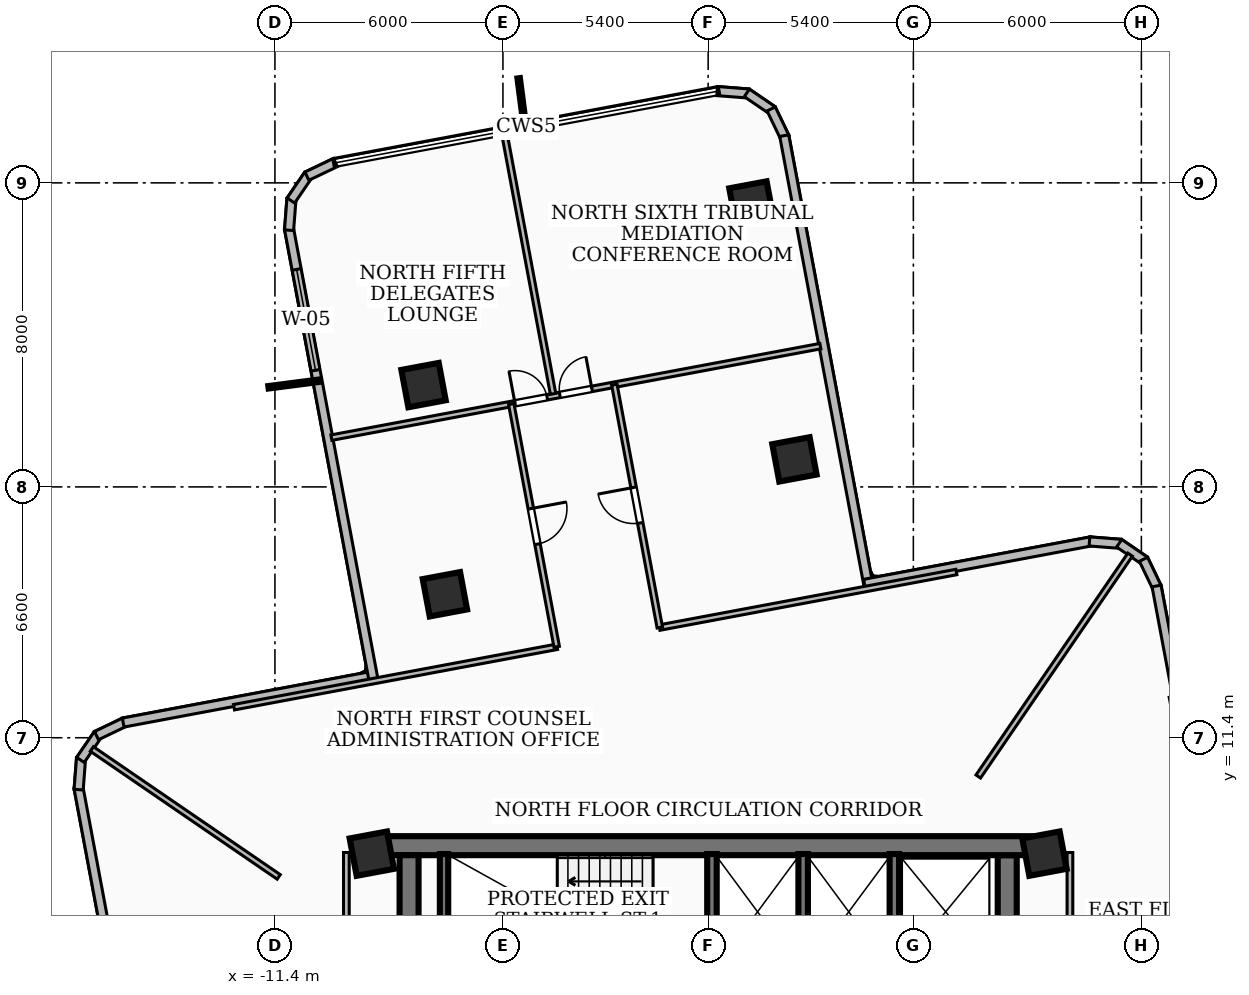
"""IFC4 building model, lengths in metres.
Left out: names, types, materials, properties, quantities, classifications, styles, units other than length and angle.
Written with IfcOpenShell. Run it as: python <this file> out.ifc"""

import sys

from ifc_helpers import new_model, si_unit, direction, frame, frame_2d, origin, origin_2d, place, context, subcontext, project, spatial, rectangle, extrude, element, fill, save


model = new_model("IFC4")
c1 = context("Model", 3, precision=1e-05, world=origin(), true_north=direction((0.0, 1.0)))
c2 = subcontext(c1, "Body", "Model", "MODEL_VIEW")
j1 = project(units=[si_unit("LENGTHUNIT", "METRE"), si_unit("PLANEANGLEUNIT", "RADIAN")], contexts=[c1])
p1 = place(None, origin())
s1 = spatial("IfcSite", under=j1, at=p1, CompositionType="ELEMENT")
p2 = place(p1, origin())
s2 = spatial("IfcBuilding", under=s1, at=p2, CompositionType="ELEMENT")
p3 = place(p2, frame((0.0, 0.0, 103.68)))
s3 = spatial("IfcBuildingStorey", under=s2, at=p3, CompositionType="ELEMENT", Elevation=103.68)
p4 = place(p3, frame((-8.78, 8.56, 0.0), z_axis=(0.0, 0.0, 1.0), x_axis=(1.0, 0.0, 0.0)))
e1 = element("IfcWall", 1, at=p4, inside=s3, PredefinedType="SHEAR", context=c2, shape_type="SweptSolid", body=[
    extrude(rectangle(XDim=17.56, YDim=0.5, at=frame_2d((8.78, 0.0))), origin(), (0.0, 0.0, 1.0), 3.2),
])
for number, where, z_axis, x_axis in (
    (2, (-7.87, 2.0, 0.0), (0.0, 0.0, 1.0), (0.0, 1.0, 0.0)),
    (3, (7.87, 8.31, 0.0), (0.0, 0.0, 1.0), (0.0, -1.0, 0.0)),
):
    element("IfcWall", number, at=place(p3, frame(where, z_axis=z_axis, x_axis=x_axis)), inside=s3, PredefinedType="SHEAR", context=c2, shape_type="SweptSolid", body=[
        extrude(rectangle(XDim=6.31, YDim=0.5, at=frame_2d((3.155, 0.0))), origin(), (0.0, 0.0, 1.0), 3.2),
    ])
p5 = place(p3, frame((-6.95, 5.28, 0.0), z_axis=(0.0, 0.0, 1.0), x_axis=(0.0, 1.0, 0.0)))
e4 = element("IfcWall", 4, at=p5, inside=s3, PredefinedType="SOLIDWALL", context=c2, shape_type="SweptSolid", body=[
    extrude(rectangle(XDim=3.06, YDim=0.22, at=frame_2d((1.53, 0.0))), origin(), (0.0, 0.0, 1.0), 3.2),
])
for number, where, z_axis, x_axis in (
    (5, (0.1, 5.3, 0.0), (0.0, 0.0, 1.0), (0.0, 1.0, 0.0)),
    (6, (2.5, 5.3, 0.0), (0.0, 0.0, 1.0), (0.0, 1.0, 0.0)),
    (7, (4.9, 5.3, 0.0), (0.0, 0.0, 1.0), (0.0, 1.0, 0.0)),
):
    element("IfcWall", number, at=place(p3, frame(where, z_axis=z_axis, x_axis=x_axis)), inside=s3, PredefinedType="SOLIDWALL", context=c2, shape_type="SweptSolid", body=[
        extrude(rectangle(XDim=3.04, YDim=0.25, at=frame_2d((1.52, 0.0))), origin(), (0.0, 0.0, 1.0), 3.2),
    ])
for number, where, z_axis, x_axis in (
    (8, (-8.85, 8.35, 0.0), (0.0, 0.0, 1.0), (0.983, 0.184, 0.0)),
    (9, (8.85, 8.35, 0.0), (0.0, 0.0, 1.0), (0.983, 0.184, 0.0)),
    (10, (2.271, 18.724, 0.0), (0.0, 0.0, 1.0), (0.983, 0.184, 0.0)),
    (11, (-6.927, 15.175, 0.0), (0.0, 0.0, 1.0), (0.983, 0.184, 0.0)),
    (12, (1.139, 25.457, 0.0), (0.0, 0.0, 1.0), (0.983, 0.184, 0.0)),
    (13, (-7.489, 20.679, 0.0), (0.0, 0.0, 1.0), (0.983, 0.184, 0.0)),
):
    element("IfcColumn", number, at=place(p3, frame(where, z_axis=z_axis, x_axis=x_axis)), inside=s3, PredefinedType="COLUMN", context=c2, shape_type="SweptSolid", body=[
        extrude(rectangle(XDim=1.0, YDim=1.0, at=origin_2d()), origin(), (0.0, 0.0, 1.0), 3.6),
    ])
p6 = place(p3, frame((-15.45, 4.113, 0.0), z_axis=(0.0, 0.0, 1.0), x_axis=(-0.18406771587, 0.982913564854, 0.0)))
e14 = element("IfcWall", 14, at=p6, inside=s3, PredefinedType="SOLIDWALL", context=c2, shape_type="SweptSolid", body=[
    extrude(rectangle(XDim=6.075, YDim=0.24, at=frame_2d((3.037, 0.0))), origin(), (0.0, 0.0, 1.0), 3.2),
])
p7 = place(p3, frame((-16.565, 10.034, 0.0), z_axis=(0.0, 0.0, 1.0), x_axis=(0.077011179273, 0.997030229365, 0.0)))
e15 = element("IfcWall", 15, at=p7, inside=s3, PredefinedType="SOLIDWALL", context=c2, shape_type="SweptSolid", body=[
    extrude(rectangle(XDim=0.831, YDim=0.24, at=frame_2d((0.415, 0.0))), origin(), (0.0, 0.0, 1.0), 3.2),
])
p8 = place(p3, frame((-16.517, 10.816, 0.0), z_axis=(0.0, 0.0, 1.0), x_axis=(0.563941688624, 0.825814611055, 0.0)))
e16 = element("IfcWall", 16, at=p8, inside=s3, PredefinedType="SOLIDWALL", context=c2, shape_type="SweptSolid", body=[
    extrude(rectangle(XDim=0.814, YDim=0.24, at=frame_2d((0.407, 0.0))), origin(), (0.0, 0.0, 1.0), 3.2),
])
p9 = place(p3, frame((-16.095, 11.456, 0.0), z_axis=(0.0, 0.0, 1.0), x_axis=(0.902044756706, 0.431642510533, 0.0)))
e17 = element("IfcWall", 17, at=p9, inside=s3, PredefinedType="SOLIDWALL", context=c2, shape_type="SweptSolid", body=[
    extrude(rectangle(XDim=0.832, YDim=0.24, at=frame_2d((0.416, 0.0))), origin(), (0.0, 0.0, 1.0), 3.2),
])
p10 = place(p3, frame((-15.393, 11.799, 0.0), z_axis=(0.0, 0.0, 1.0), x_axis=(0.982891759821, 0.184184115697, 0.0)))
e18 = element("IfcWall", 18, at=p10, inside=s3, PredefinedType="SOLIDWALL", context=c2, shape_type="SweptSolid", body=[
    extrude(rectangle(XDim=6.776, YDim=0.24, at=frame_2d((3.388, 0.0))), origin(), (0.0, 0.0, 1.0), 3.2),
])
p11 = place(p3, frame((-8.809, 12.935, 0.0), z_axis=(0.0, 0.0, 1.0), x_axis=(-0.184008977601, 0.982924562803, 0.0)))
e19 = element("IfcWall", 19, at=p11, inside=s3, PredefinedType="SOLIDWALL", context=c2, shape_type="SweptSolid", body=[
    extrude(rectangle(XDim=12.075, YDim=0.24, at=frame_2d((6.038, 0.0))), origin(), (0.0, 0.0, 1.0), 3.2),
])
p12 = place(p11, frame((8.275, 0.0, 0.85)))
e20 = element("IfcOpeningElement", 20, at=p12, cuts=e19, PredefinedType="OPENING", context=c2, shape_type="SweptSolid", body=[
    extrude(rectangle(XDim=2.7, YDim=1.85, at=frame_2d((1.35, 0.925))), frame((0.0, 0.13, 0.0), z_axis=(0.0, -1.0, 0.0), x_axis=(1.0, 0.0, 0.0)), (0.0, 0.0, 1.0), 0.26),
])
p13 = place(p3, frame((-11.028, 24.754, 0.0), z_axis=(0.0, 0.0, 1.0), x_axis=(0.077011179273, 0.997030229365, 0.0)))
e21 = element("IfcWall", 21, at=p13, inside=s3, PredefinedType="SOLIDWALL", context=c2, shape_type="SweptSolid", body=[
    extrude(rectangle(XDim=0.831, YDim=0.24, at=frame_2d((0.415, 0.0))), origin(), (0.0, 0.0, 1.0), 3.2),
])
p14 = place(p3, frame((-10.98, 25.536, 0.0), z_axis=(0.0, 0.0, 1.0), x_axis=(0.563941688624, 0.825814611055, 0.0)))
e22 = element("IfcWall", 22, at=p14, inside=s3, PredefinedType="SOLIDWALL", context=c2, shape_type="SweptSolid", body=[
    extrude(rectangle(XDim=0.814, YDim=0.24, at=frame_2d((0.407, 0.0))), origin(), (0.0, 0.0, 1.0), 3.2),
])
p15 = place(p3, frame((-10.558, 26.176, 0.0), z_axis=(0.0, 0.0, 1.0), x_axis=(0.902044756706, 0.431642510533, 0.0)))
e23 = element("IfcWall", 23, at=p15, inside=s3, PredefinedType="SOLIDWALL", context=c2, shape_type="SweptSolid", body=[
    extrude(rectangle(XDim=0.832, YDim=0.24, at=frame_2d((0.416, 0.0))), origin(), (0.0, 0.0, 1.0), 3.2),
])
p16 = place(p3, frame((0.237, 28.415, 0.0), z_axis=(0.0, 0.0, 1.0), x_axis=(0.997028485347, -0.077033754987, 0.0)))
e24 = element("IfcWall", 24, at=p16, inside=s3, PredefinedType="SOLIDWALL", context=c2, shape_type="SweptSolid", body=[
    extrude(rectangle(XDim=0.83, YDim=0.24, at=frame_2d((0.415, 0.0))), origin(), (0.0, 0.0, 1.0), 3.2),
])
p17 = place(p3, frame((1.019, 28.367, 0.0), z_axis=(0.0, 0.0, 1.0), x_axis=(0.825719176392, -0.564081414105, 0.0)))
e25 = element("IfcWall", 25, at=p17, inside=s3, PredefinedType="SOLIDWALL", context=c2, shape_type="SweptSolid", body=[
    extrude(rectangle(XDim=0.814, YDim=0.24, at=frame_2d((0.407, 0.0))), origin(), (0.0, 0.0, 1.0), 3.2),
])
p18 = place(p3, frame((1.659, 27.945, 0.0), z_axis=(0.0, 0.0, 1.0), x_axis=(0.431881390908, -0.901930409836, 0.0)))
e26 = element("IfcWall", 26, at=p18, inside=s3, PredefinedType="SOLIDWALL", context=c2, shape_type="SweptSolid", body=[
    extrude(rectangle(XDim=0.832, YDim=0.24, at=frame_2d((0.416, 0.0))), origin(), (0.0, 0.0, 1.0), 3.2),
])
p19 = place(p3, frame((2.002, 27.243, 0.0), z_axis=(0.0, 0.0, 1.0), x_axis=(0.184106644671, -0.982906273959, 0.0)))
e27 = element("IfcWall", 27, at=p19, inside=s3, PredefinedType="SOLIDWALL", context=c2, shape_type="SweptSolid", body=[
    extrude(rectangle(XDim=12.075, YDim=0.24, at=frame_2d((6.038, 0.0))), origin(), (0.0, 0.0, 1.0), 2.346),
])
p20 = place(p3, frame((4.113, 15.45, 0.0), z_axis=(0.0, 0.0, 1.0), x_axis=(0.982913564854, 0.18406771587, 0.0)))
e28 = element("IfcWall", 28, at=p20, inside=s3, PredefinedType="SOLIDWALL", context=c2, shape_type="SweptSolid", body=[
    extrude(rectangle(XDim=6.075, YDim=0.24, at=frame_2d((3.037, 0.0))), origin(), (0.0, 0.0, 1.0), 2.346),
])
p21 = place(p3, frame((10.034, 16.565, 0.0), z_axis=(0.0, 0.0, 1.0), x_axis=(0.997030229365, -0.077011179273, 0.0)))
e29 = element("IfcWall", 29, at=p21, inside=s3, PredefinedType="SOLIDWALL", context=c2, shape_type="SweptSolid", body=[
    extrude(rectangle(XDim=0.831, YDim=0.24, at=frame_2d((0.415, 0.0))), origin(), (0.0, 0.0, 1.0), 3.2),
])
p22 = place(p3, frame((10.816, 16.517, 0.0), z_axis=(0.0, 0.0, 1.0), x_axis=(0.825814611055, -0.563941688624, 0.0)))
e30 = element("IfcWall", 30, at=p22, inside=s3, PredefinedType="SOLIDWALL", context=c2, shape_type="SweptSolid", body=[
    extrude(rectangle(XDim=0.814, YDim=0.24, at=frame_2d((0.407, 0.0))), origin(), (0.0, 0.0, 1.0), 3.2),
])
p23 = place(p3, frame((11.456, 16.095, 0.0), z_axis=(0.0, 0.0, 1.0), x_axis=(0.431642510533, -0.902044756706, 0.0)))
e31 = element("IfcWall", 31, at=p23, inside=s3, PredefinedType="SOLIDWALL", context=c2, shape_type="SweptSolid", body=[
    extrude(rectangle(XDim=0.832, YDim=0.24, at=frame_2d((0.416, 0.0))), origin(), (0.0, 0.0, 1.0), 3.2),
])
p24 = place(p3, frame((11.799, 15.393, 0.0), z_axis=(0.0, 0.0, 1.0), x_axis=(0.184184115697, -0.982891759821, 0.0)))
e32 = element("IfcWall", 32, at=p24, inside=s3, PredefinedType="SOLIDWALL", context=c2, shape_type="SweptSolid", body=[
    extrude(rectangle(XDim=6.776, YDim=0.24, at=frame_2d((3.388, 0.0))), origin(), (0.0, 0.0, 1.0), 3.2),
])
for number, where, z_axis, x_axis in (
    (33, (-9.52, 1.75, 0.0), (0.0, 0.0, 1.0), (0.0, 1.0, 0.0)),
    (34, (9.52, 1.75, 0.0), (0.0, 0.0, 1.0), (0.0, 1.0, 0.0)),
):
    element("IfcWall", number, at=place(p3, frame(where, z_axis=z_axis, x_axis=x_axis)), inside=s3, PredefinedType="PARTITIONING", context=c2, shape_type="SweptSolid", body=[
        extrude(rectangle(XDim=6.63, YDim=0.15, at=frame_2d((3.315, 0.0))), origin(), (0.0, 0.0, 1.0), 2.346),
    ])
p25 = place(p3, frame((7.108, 10.38, 0.0), z_axis=(0.0, 0.0, 1.0), x_axis=(0.564900413187, 0.825159089619, 0.0)))
e35 = element("IfcWall", 35, at=p25, inside=s3, PredefinedType="PARTITIONING", context=c2, shape_type="SweptSolid", body=[
    extrude(rectangle(XDim=7.074, YDim=0.145, at=frame_2d((3.537, 0.0))), origin(), (0.0, 0.0, 1.0), 2.346),
])
p26 = place(p3, frame((-11.3, 7.738, 0.0), z_axis=(0.0, 0.0, 1.0), x_axis=(-0.825173577049, 0.564879250584, 0.0)))
e36 = element("IfcWall", 36, at=p26, inside=s3, PredefinedType="PARTITIONING", context=c2, shape_type="SweptSolid", body=[
    extrude(rectangle(XDim=5.959, YDim=0.145, at=frame_2d((2.979, 0.0))), origin(), (0.0, 0.0, 1.0), 3.2),
])
for number, where, z_axis, x_axis in (
    (37, (13.794, 3.975, 0.0), (0.0, 0.0, 1.0), (-0.184, 0.983, 0.0)),
    (38, (-3.975, 13.794, 0.0), (0.0, 0.0, 1.0), (-0.983, -0.184, 0.0)),
):
    element("IfcWall", number, at=place(p3, frame(where, z_axis=z_axis, x_axis=x_axis)), inside=s3, PredefinedType="PARTITIONING", context=c2, shape_type="SweptSolid", body=[
        extrude(rectangle(XDim=8.65, YDim=0.145, at=frame_2d((4.325, 0.0))), origin(), (0.0, 0.0, 1.0), 2.346),
    ])
p27 = place(p3, frame((6.532, 15.761, 0.0), z_axis=(0.0, 0.0, 1.0), x_axis=(-0.98292290903, -0.184017811376, 0.0)))
e39 = element("IfcWall", 39, at=p27, inside=s3, PredefinedType="PARTITIONING", context=c2, shape_type="SweptSolid", body=[
    extrude(rectangle(XDim=7.95, YDim=0.145, at=frame_2d((3.975, 0.0))), origin(), (0.0, 0.0, 1.0), 2.346),
])
p28 = place(p3, frame((-5.181, 20.181, 0.0), z_axis=(0.0, 0.0, 1.0), x_axis=(0.183973297475, -0.982931241652, 0.0)))
e40 = element("IfcWall", 40, at=p28, inside=s3, PredefinedType="PARTITIONING", context=c2, shape_type="SweptSolid", body=[
    extrude(rectangle(XDim=6.5, YDim=0.145, at=frame_2d((3.25, 0.0))), origin(), (0.0, 0.0, 1.0), 3.2),
])
p29 = place(p28, frame((2.8, 0.0, 0.0)))
e41 = element("IfcOpeningElement", 41, at=p29, cuts=e40, PredefinedType="OPENING", context=c2, shape_type="SweptSolid", body=[
    extrude(rectangle(XDim=0.95, YDim=2.08, at=frame_2d((0.475, 1.04))), frame((0.0, 0.083, 0.0), z_axis=(0.0, -1.0, 0.0), x_axis=(1.0, 0.0, 0.0)), (0.0, 0.0, 1.0), 0.165),
])
p30 = place(p3, frame((-1.272, 14.3, 0.0), z_axis=(0.0, 0.0, 1.0), x_axis=(-0.184009586708, 0.982924448775, 0.0)))
e42 = element("IfcWall", 42, at=p30, inside=s3, PredefinedType="PARTITIONING", context=c2, shape_type="SweptSolid", body=[
    extrude(rectangle(XDim=6.5, YDim=0.145, at=frame_2d((3.25, 0.0))), origin(), (0.0, 0.0, 1.0), 3.2),
])
p31 = place(p30, frame((2.8, 0.0, 0.0)))
e43 = element("IfcOpeningElement", 43, at=p31, cuts=e42, PredefinedType="OPENING", context=c2, shape_type="SweptSolid", body=[
    extrude(rectangle(XDim=0.95, YDim=2.08, at=frame_2d((0.475, 1.04))), frame((0.0, 0.083, 0.0), z_axis=(0.0, -1.0, 0.0), x_axis=(1.0, 0.0, 0.0)), (0.0, 0.0, 1.0), 0.165),
])
p32 = place(p3, frame((-4.081, 20.448, 0.0), z_axis=(0.0, 0.0, 1.0), x_axis=(-0.18384493789, 0.982955257787, 0.0)))
e44 = element("IfcWall", 44, at=p32, inside=s3, PredefinedType="PARTITIONING", context=c2, shape_type="SweptSolid", body=[
    extrude(rectangle(XDim=6.945, YDim=0.145, at=frame_2d((3.473, 0.0))), origin(), (0.0, 0.0, 1.0), 2.692),
])
p33 = place(p3, frame((-9.914, 19.296, 0.0), z_axis=(0.0, 0.0, 1.0), x_axis=(0.982932308489, 0.183967597498, 0.0)))
e45 = element("IfcWall", 45, at=p33, inside=s3, PredefinedType="PARTITIONING", context=c2, shape_type="SweptSolid", body=[
    extrude(rectangle(XDim=13.09, YDim=0.145, at=frame_2d((6.545, 0.0))), origin(), (0.0, 0.0, 1.0), 2.346),
])
p34 = place(p33, frame((6.115, 0.0, 0.0)))
e46 = element("IfcOpeningElement", 46, at=p34, cuts=e45, PredefinedType="OPENING", context=c2, shape_type="SweptSolid", body=[
    extrude(rectangle(XDim=0.86, YDim=2.04, at=frame_2d((0.43, 1.02))), frame((0.0, 0.083, 0.0), z_axis=(0.0, -1.0, 0.0), x_axis=(1.0, 0.0, 0.0)), (0.0, 0.0, 1.0), 0.165),
])
p35 = place(p33, frame((4.915, 0.0, 0.0)))
e47 = element("IfcOpeningElement", 47, at=p35, cuts=e45, PredefinedType="OPENING", context=c2, shape_type="SweptSolid", body=[
    extrude(rectangle(XDim=0.86, YDim=2.04, at=frame_2d((0.43, 1.02))), frame((0.0, 0.083, 0.0), z_axis=(0.0, -1.0, 0.0), x_axis=(1.0, 0.0, 0.0)), (0.0, 0.0, 1.0), 0.165),
])
p36 = place(p12, origin())
e48 = element("IfcWindow", 48, at=p36, inside=s3, PartitioningType="SINGLE_PANEL", PredefinedType="WINDOW", context=c2, shape_type="SweptSolid", body=[
    extrude(rectangle(XDim=2.7, YDim=1.85, at=frame_2d((1.35, 0.925))), frame((0.0, 0.03, 0.0), z_axis=(0.0, -1.0, 0.0), x_axis=(1.0, 0.0, 0.0)), (0.0, 0.0, 1.0), 0.06),
])
fill(e20, e48)
p37 = place(p29, origin())
e49 = element("IfcDoor", 49, at=p37, inside=s3, OperationType="SINGLE_SWING_LEFT", PredefinedType="DOOR", context=c2, shape_type="SweptSolid", body=[
    extrude(rectangle(XDim=0.95, YDim=2.08, at=frame_2d((0.475, 1.04))), frame((0.0, 0.025, 0.0), z_axis=(0.0, -1.0, 0.0), x_axis=(1.0, 0.0, 0.0)), (0.0, 0.0, 1.0), 0.05),
])
fill(e41, e49)
p38 = place(p31, origin())
e50 = element("IfcDoor", 50, at=p38, inside=s3, OperationType="SINGLE_SWING_RIGHT", PredefinedType="DOOR", context=c2, shape_type="SweptSolid", body=[
    extrude(rectangle(XDim=0.95, YDim=2.08, at=frame_2d((0.475, 1.04))), frame((0.0, 0.025, 0.0), z_axis=(0.0, -1.0, 0.0), x_axis=(1.0, 0.0, 0.0)), (0.0, 0.0, 1.0), 0.05),
])
fill(e43, e50)
p39 = place(p34, origin())
e51 = element("IfcDoor", 51, at=p39, inside=s3, OperationType="SINGLE_SWING_RIGHT", PredefinedType="DOOR", context=c2, shape_type="SweptSolid", body=[
    extrude(rectangle(XDim=0.86, YDim=2.04, at=frame_2d((0.43, 1.02))), frame((0.0, 0.025, 0.0), z_axis=(0.0, -1.0, 0.0), x_axis=(1.0, 0.0, 0.0)), (0.0, 0.0, 1.0), 0.05),
])
fill(e46, e51)
p40 = place(p35, origin())
e52 = element("IfcDoor", 52, at=p40, inside=s3, OperationType="SINGLE_SWING_LEFT", PredefinedType="DOOR", context=c2, shape_type="SweptSolid", body=[
    extrude(rectangle(XDim=0.86, YDim=2.04, at=frame_2d((0.43, 1.02))), frame((0.0, 0.025, 0.0), z_axis=(0.0, -1.0, 0.0), x_axis=(1.0, 0.0, 0.0)), (0.0, 0.0, 1.0), 0.05),
])
fill(e47, e52)
save(model, sys.argv[1])
